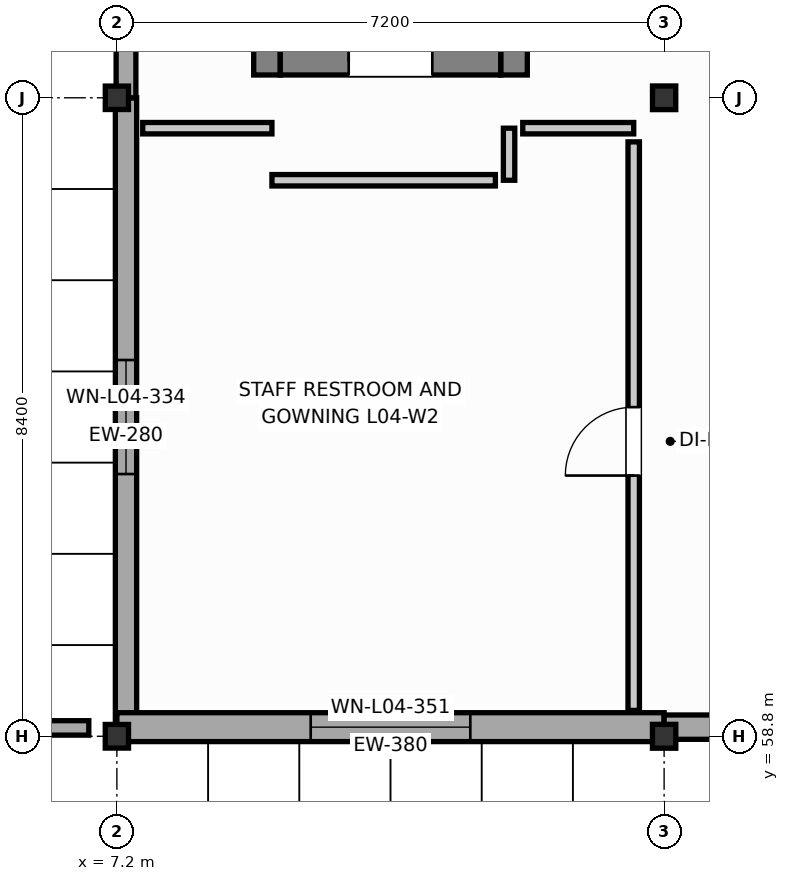
"""IFC4 building model, lengths in metres.
Left out: names, types, materials, properties, quantities, classifications, styles, units other than length and angle.
Written with IfcOpenShell. Run it as: python <this file> out.ifc"""

import sys

from ifc_helpers import new_model, si_unit, direction, frame, frame_2d, origin, origin_2d, place, context, subcontext, project, spatial, rectangle, i_section, extrude, element, fill, save


model = new_model("IFC4")
c1 = context("Model", 3, precision=1e-05, world=origin(), true_north=direction((0.0, 1.0)))
c2 = subcontext(c1, "Body", "Model", "MODEL_VIEW")
j1 = project(units=[si_unit("LENGTHUNIT", "METRE"), si_unit("PLANEANGLEUNIT", "RADIAN")], contexts=[c1])
p1 = place(None, origin())
s1 = spatial("IfcSite", under=j1, at=p1, CompositionType="ELEMENT")
p2 = place(p1, origin())
s2 = spatial("IfcBuilding", under=s1, at=p2, CompositionType="ELEMENT")
p3 = place(p2, frame((0.0, 0.0, 17.4)))
s3 = spatial("IfcBuildingStorey", under=s2, at=p3, CompositionType="ELEMENT", Elevation=17.4)
p4 = place(p3, frame((7.2, 58.8, 0.0), z_axis=(0.0, 0.0, 1.0), x_axis=(1.0, 0.0, 0.0)))
e1 = element("IfcColumn", 1, at=p4, inside=s3, PredefinedType="COLUMN", context=c2, shape_type="SweptSolid", body=[
    extrude(i_section(OverallWidth=0.306, OverallDepth=0.311, WebThickness=0.011, FlangeThickness=0.017, FilletRadius=0.015, at=origin_2d()), origin(), (0.0, 0.0, 1.0), 4.2),
])
p5 = place(p3, frame((7.2, 67.2, 0.0), z_axis=(0.0, 0.0, 1.0), x_axis=(1.0, 0.0, 0.0)))
e2 = element("IfcColumn", 2, at=p5, inside=s3, PredefinedType="COLUMN", context=c2, shape_type="SweptSolid", body=[
    extrude(i_section(OverallWidth=0.305, OverallDepth=0.308, WebThickness=0.01, FlangeThickness=0.015, FilletRadius=0.015, at=origin_2d()), origin(), (0.0, 0.0, 1.0), 4.2),
])
p6 = place(p3, frame((14.4, 58.8, 0.0), z_axis=(0.0, 0.0, 1.0), x_axis=(1.0, 0.0, 0.0)))
e3 = element("IfcColumn", 3, at=p6, inside=s3, PredefinedType="COLUMN", context=c2, shape_type="SweptSolid", body=[
    extrude(i_section(OverallWidth=0.307, OverallDepth=0.314, WebThickness=0.012, FlangeThickness=0.019, FilletRadius=0.016, at=origin_2d()), origin(), (0.0, 0.0, 1.0), 4.2),
])
p7 = place(p3, frame((14.4, 67.2, 0.0), z_axis=(0.0, 0.0, 1.0), x_axis=(1.0, 0.0, 0.0)))
e4 = element("IfcColumn", 4, at=p7, inside=s3, PredefinedType="COLUMN", context=c2, shape_type="SweptSolid", body=[
    extrude(i_section(OverallWidth=0.306, OverallDepth=0.311, WebThickness=0.011, FlangeThickness=0.017, FilletRadius=0.015, at=origin_2d()), origin(), (0.0, 0.0, 1.0), 4.2),
])
for number, where, z_axis, x_axis in (
    (5, (9.175, 67.5, 0.0), (0.0, 0.0, 1.0), (0.0, 1.0, 0.0)),
    (6, (12.425, 67.5, 0.0), (0.0, 0.0, 1.0), (0.0, 1.0, 0.0)),
):
    element("IfcWall", number, at=place(p3, frame(where, z_axis=z_axis, x_axis=x_axis)), inside=s3, PredefinedType="SHEAR", context=c2, shape_type="SweptSolid", body=[
        extrude(rectangle(XDim=7.8, YDim=0.35, at=frame_2d((3.9, 0.0))), origin(), (0.0, 0.0, 1.0), 3.99),
    ])
p8 = place(p3, frame((9.35, 67.675, 0.0), z_axis=(0.0, 0.0, 1.0), x_axis=(1.0, 0.0, 0.0)))
e7 = element("IfcWall", 7, at=p8, inside=s3, PredefinedType="SHEAR", context=c2, shape_type="SweptSolid", body=[
    extrude(rectangle(XDim=2.9, YDim=0.35, at=frame_2d((1.45, 0.0))), origin(), (0.0, 0.0, 1.0), 3.99),
])
p9 = place(p8, frame((0.9, 0.0, 0.0)))
e8 = element("IfcOpeningElement", 8, at=p9, cuts=e7, PredefinedType="OPENING", context=c2, shape_type="SweptSolid", body=[
    extrude(rectangle(XDim=1.1, YDim=2.15, at=frame_2d((0.55, 1.075))), frame((0.0, 0.185, 0.0), z_axis=(0.0, -1.0, 0.0), x_axis=(1.0, 0.0, 0.0)), (0.0, 0.0, 1.0), 0.37),
])
p10 = place(p3, frame((7.32, 58.8, 0.0), z_axis=(0.0, 0.0, 1.0), x_axis=(0.0, 1.0, 0.0)))
e9 = element("IfcWall", 9, at=p10, inside=s3, PredefinedType="SOLIDWALL", context=c2, shape_type="SweptSolid", body=[
    extrude(rectangle(XDim=8.4, YDim=0.28, at=frame_2d((4.2, 0.0))), origin(), (0.0, 0.0, 1.0), 3.172),
])
p11 = place(p10, frame((3.45, 0.0, 0.95)))
e10 = element("IfcOpeningElement", 10, at=p11, cuts=e9, PredefinedType="OPENING", context=c2, shape_type="SweptSolid", body=[
    extrude(rectangle(XDim=1.5, YDim=1.35, at=frame_2d((0.75, 0.675))), frame((0.0, 0.15, 0.0), z_axis=(0.0, -1.0, 0.0), x_axis=(1.0, 0.0, 0.0)), (0.0, 0.0, 1.0), 0.3),
])
p12 = place(p3, frame((7.32, 67.2, 0.0), z_axis=(0.0, 0.0, 1.0), x_axis=(0.0, 1.0, 0.0)))
e11 = element("IfcWall", 11, at=p12, inside=s3, PredefinedType="SOLIDWALL", context=c2, shape_type="SweptSolid", body=[
    extrude(rectangle(XDim=8.4, YDim=0.26, at=frame_2d((4.2, 0.0))), origin(), (0.0, 0.0, 1.0), 3.172),
])
p13 = place(p12, frame((3.45, 0.0, 0.95)))
e12 = element("IfcOpeningElement", 12, at=p13, cuts=e11, PredefinedType="OPENING", context=c2, shape_type="SweptSolid", body=[
    extrude(rectangle(XDim=1.5, YDim=1.55, at=frame_2d((0.75, 0.775))), frame((0.0, 0.14, 0.0), z_axis=(0.0, -1.0, 0.0), x_axis=(1.0, 0.0, 0.0)), (0.0, 0.0, 1.0), 0.28),
])
p14 = place(p3, frame((7.2, 58.92, 0.0), z_axis=(0.0, 0.0, 1.0), x_axis=(1.0, 0.0, 0.0)))
e13 = element("IfcWall", 13, at=p14, inside=s3, PredefinedType="SOLIDWALL", context=c2, shape_type="SweptSolid", body=[
    extrude(rectangle(XDim=7.2, YDim=0.38, at=frame_2d((3.6, 0.0))), origin(), (0.0, 0.0, 1.0), 3.529),
])
p15 = place(p14, frame((2.55, 0.0, 0.95)))
e14 = element("IfcOpeningElement", 14, at=p15, cuts=e13, PredefinedType="OPENING", context=c2, shape_type="SweptSolid", body=[
    extrude(rectangle(XDim=2.1, YDim=1.55, at=frame_2d((1.05, 0.775))), frame((0.0, 0.2, 0.0), z_axis=(0.0, -1.0, 0.0), x_axis=(1.0, 0.0, 0.0)), (0.0, 0.0, 1.0), 0.4),
])
p16 = place(p3, frame((14.4, 58.92, 0.0), z_axis=(0.0, 0.0, 1.0), x_axis=(1.0, 0.0, 0.0)))
e15 = element("IfcWall", 15, at=p16, inside=s3, PredefinedType="SOLIDWALL", context=c2, shape_type="SweptSolid", body=[
    extrude(rectangle(XDim=7.2, YDim=0.32, at=frame_2d((3.6, 0.0))), origin(), (0.0, 0.0, 1.0), 3.482),
])
p17 = place(p16, frame((2.55, 0.0, 0.95)))
e16 = element("IfcOpeningElement", 16, at=p17, cuts=e15, PredefinedType="OPENING", context=c2, shape_type="SweptSolid", body=[
    extrude(rectangle(XDim=2.1, YDim=1.75, at=frame_2d((1.05, 0.875))), frame((0.0, 0.17, 0.0), z_axis=(0.0, -1.0, 0.0), x_axis=(1.0, 0.0, 0.0)), (0.0, 0.0, 1.0), 0.34),
])
p18 = place(p3, frame((6.831, 58.91, 0.0), z_axis=(0.0, 0.0, 1.0), x_axis=(-1.0, 0.0, 0.0)))
e17 = element("IfcWall", 17, at=p18, inside=s3, PredefinedType="PARAPET", context=c2, shape_type="SweptSolid", body=[
    extrude(rectangle(XDim=6.611, YDim=0.19, at=frame_2d((3.305, 0.0))), origin(), (0.0, 0.0, 1.0), 1.15),
])
p19 = place(p3, frame((12.36, 66.115, 0.0), z_axis=(0.0, 0.0, 1.0), x_axis=(0.0, 1.0, 0.0)))
e18 = element("IfcWall", 18, at=p19, inside=s3, PredefinedType="PLUMBINGWALL", context=c2, shape_type="SweptSolid", body=[
    extrude(rectangle(XDim=0.685, YDim=0.15, at=frame_2d((0.343, 0.0))), origin(), (0.0, 0.0, 1.0), 3.945),
])
p20 = place(p3, frame((12.54, 66.8, 0.0), z_axis=(0.0, 0.0, 1.0), x_axis=(1.0, 0.0, 0.0)))
e19 = element("IfcWall", 19, at=p20, inside=s3, PredefinedType="PLUMBINGWALL", context=c2, shape_type="SweptSolid", body=[
    extrude(rectangle(XDim=1.46, YDim=0.15, at=frame_2d((0.73, 0.0))), origin(), (0.0, 0.0, 1.0), 3.945),
])
p21 = place(p3, frame((14.0, 66.62, 0.0), z_axis=(0.0, 0.0, 1.0), x_axis=(0.0, -1.0, 0.0)))
e20 = element("IfcWall", 20, at=p21, inside=s3, PredefinedType="PLUMBINGWALL", context=c2, shape_type="SweptSolid", body=[
    extrude(rectangle(XDim=7.48, YDim=0.15, at=frame_2d((3.74, 0.0))), origin(), (0.0, 0.0, 1.0), 3.945),
])
p22 = place(p21, frame((3.49, 0.0, 0.0)))
e21 = element("IfcOpeningElement", 21, at=p22, cuts=e20, PredefinedType="OPENING", context=c2, shape_type="SweptSolid", body=[
    extrude(rectangle(XDim=0.9, YDim=2.1, at=frame_2d((0.45, 1.05))), frame((0.0, 0.085, 0.0), z_axis=(0.0, -1.0, 0.0), x_axis=(1.0, 0.0, 0.0)), (0.0, 0.0, 1.0), 0.17),
])
p23 = place(p3, frame((7.54, 66.8, 0.0), z_axis=(0.0, 0.0, 1.0), x_axis=(1.0, 0.0, 0.0)))
e22 = element("IfcWall", 22, at=p23, inside=s3, PredefinedType="PLUMBINGWALL", context=c2, shape_type="SweptSolid", body=[
    extrude(rectangle(XDim=1.7, YDim=0.15, at=frame_2d((0.85, 0.0))), origin(), (0.0, 0.0, 1.0), 3.945),
])
p24 = place(p3, frame((9.24, 66.115, 0.0), z_axis=(0.0, 0.0, 1.0), x_axis=(1.0, 0.0, 0.0)))
e23 = element("IfcWall", 23, at=p24, inside=s3, PredefinedType="PLUMBINGWALL", context=c2, shape_type="SweptSolid", body=[
    extrude(rectangle(XDim=2.94, YDim=0.15, at=frame_2d((1.47, 0.0))), origin(), (0.0, 0.0, 1.0), 3.598),
])
p25 = place(p9, origin())
e24 = element("IfcDoor", 24, at=p25, inside=s3, OperationType="SINGLE_SWING_LEFT", PredefinedType="DOOR", context=c2, shape_type="SweptSolid", body=[
    extrude(rectangle(XDim=1.1, YDim=2.15, at=frame_2d((0.55, 1.075))), frame((0.0, 0.025, 0.0), z_axis=(0.0, -1.0, 0.0), x_axis=(1.0, 0.0, 0.0)), (0.0, 0.0, 1.0), 0.05),
])
fill(e8, e24)
p26 = place(p11, origin())
e25 = element("IfcWindow", 25, at=p26, inside=s3, PartitioningType="SINGLE_PANEL", PredefinedType="WINDOW", context=c2, shape_type="SweptSolid", body=[
    extrude(rectangle(XDim=1.5, YDim=1.35, at=frame_2d((0.75, 0.675))), frame((0.0, 0.03, 0.0), z_axis=(0.0, -1.0, 0.0), x_axis=(1.0, 0.0, 0.0)), (0.0, 0.0, 1.0), 0.06),
])
fill(e10, e25)
p27 = place(p15, origin())
e26 = element("IfcWindow", 26, at=p27, inside=s3, PartitioningType="SINGLE_PANEL", PredefinedType="WINDOW", context=c2, shape_type="SweptSolid", body=[
    extrude(rectangle(XDim=2.1, YDim=1.55, at=frame_2d((1.05, 0.775))), frame((0.0, 0.03, 0.0), z_axis=(0.0, -1.0, 0.0), x_axis=(1.0, 0.0, 0.0)), (0.0, 0.0, 1.0), 0.06),
])
fill(e14, e26)
p28 = place(p22, frame((0.9, 0.0, 0.0), z_axis=(0.0, 0.0, 1.0), x_axis=(-1.0, 0.0, 0.0)))
e27 = element("IfcDoor", 27, at=p28, inside=s3, OperationType="SINGLE_SWING_LEFT", PredefinedType="DOOR", context=c2, shape_type="SweptSolid", body=[
    extrude(rectangle(XDim=0.9, YDim=2.1, at=frame_2d((0.45, 1.05))), frame((0.0, 0.025, 0.0), z_axis=(0.0, -1.0, 0.0), x_axis=(1.0, 0.0, 0.0)), (0.0, 0.0, 1.0), 0.05),
])
fill(e21, e27)
save(model, sys.argv[1])
